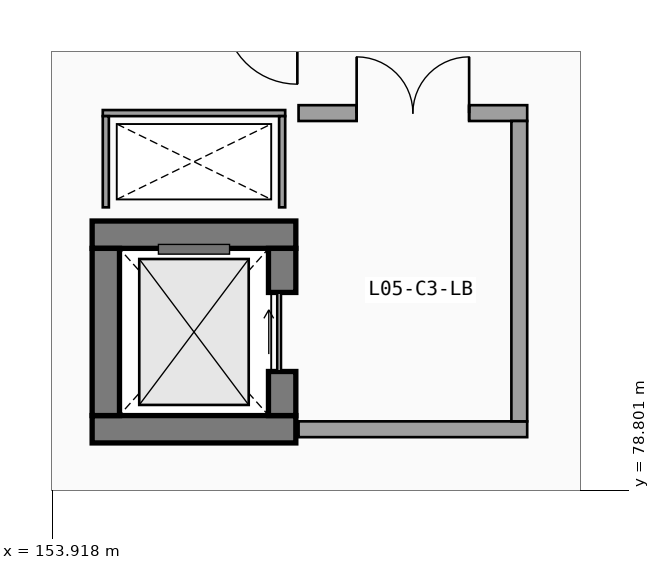
"""IFC4 building model, lengths in metres.
Left out: names, types, materials, properties, quantities, classifications, styles, units other than length and angle.
Written with IfcOpenShell. Run it as: python <this file> out.ifc"""

import sys

from ifc_helpers import new_model, si_unit, direction, frame, frame_2d, origin, place, context, subcontext, project, spatial, rectangle, extrude, element, fill, save


model = new_model("IFC4")
c1 = context("Model", 3, precision=1e-05, world=origin(), true_north=direction((0.0, 1.0)))
c2 = subcontext(c1, "Body", "Model", "MODEL_VIEW")
j1 = project(units=[si_unit("LENGTHUNIT", "METRE"), si_unit("PLANEANGLEUNIT", "RADIAN")], contexts=[c1])
p1 = place(None, origin())
s1 = spatial("IfcSite", under=j1, at=p1, CompositionType="ELEMENT")
p2 = place(p1, origin())
s2 = spatial("IfcBuilding", under=s1, at=p2, CompositionType="ELEMENT")
p3 = place(p2, frame((0.0, 0.0, 23.1)))
s3 = spatial("IfcBuildingStorey", under=s2, at=p3, CompositionType="ELEMENT", Elevation=23.1)
for number, where, z_axis, x_axis in (
    (1, (154.575, 79.8, 0.0), (0.0, 0.0, 1.0), (1.0, 0.0, 0.0)),
    (2, (157.925, 83.0, 0.0), (0.0, 0.0, 1.0), (-1.0, 0.0, 0.0)),
):
    element("IfcWall", number, at=place(p3, frame(where, z_axis=z_axis, x_axis=x_axis)), inside=s3, PredefinedType="SHEAR", context=c2, shape_type="SweptSolid", body=[
        extrude(rectangle(XDim=3.35, YDim=0.45, at=frame_2d((1.675, 0.0))), origin(), (0.0, 0.0, 1.0), 4.82),
    ])
p4 = place(p3, frame((154.8, 82.775, 0.0), z_axis=(0.0, 0.0, 1.0), x_axis=(0.0, -1.0, 0.0)))
e3 = element("IfcWall", 3, at=p4, inside=s3, PredefinedType="SHEAR", context=c2, shape_type="SweptSolid", body=[
    extrude(rectangle(XDim=2.75, YDim=0.45, at=frame_2d((1.375, 0.0))), origin(), (0.0, 0.0, 1.0), 4.82),
])
p5 = place(p3, frame((157.7, 80.025, 0.0), z_axis=(0.0, 0.0, 1.0), x_axis=(0.0, 1.0, 0.0)))
e4 = element("IfcWall", 4, at=p5, inside=s3, PredefinedType="SHEAR", context=c2, shape_type="SweptSolid", body=[
    extrude(rectangle(XDim=2.75, YDim=0.45, at=frame_2d((1.375, 0.0))), origin(), (0.0, 0.0, 1.0), 4.82),
])
p6 = place(p5, frame((0.725, 0.0, 0.0), z_axis=(0.0, 0.0, 1.0), x_axis=(1.0, 0.0, 0.0)))
e5 = element("IfcOpeningElement", 5, at=p6, cuts=e4, PredefinedType="OPENING", context=c2, shape_type="SweptSolid", body=[
    extrude(rectangle(XDim=1.3, YDim=2.25, at=frame_2d((0.65, 1.125))), frame((0.0, 0.235, 0.0), z_axis=(0.0, -1.0, 0.0), x_axis=(1.0, 0.0, 0.0)), (0.0, 0.0, 1.0), 0.47),
])
p7 = place(p3, frame((157.75, 85.0, 0.0), z_axis=(0.0, 0.0, 1.0), x_axis=(-1.0, 0.0, 0.0)))
e6 = element("IfcWall", 6, at=p7, inside=s3, PredefinedType="PARTITIONING", context=c2, shape_type="SweptSolid", body=[
    extrude(rectangle(XDim=3.0, YDim=0.1, at=frame_2d((1.5, 0.0))), origin(), (0.0, 0.0, 1.0), 4.82),
])
for number, where, z_axis, x_axis in (
    (7, (154.8, 84.95, 0.0), (0.0, 0.0, 1.0), (0.0, -1.0, 0.0)),
    (8, (157.7, 83.45, 0.0), (0.0, 0.0, 1.0), (0.0, 1.0, 0.0)),
):
    element("IfcWall", number, at=place(p3, frame(where, z_axis=z_axis, x_axis=x_axis)), inside=s3, PredefinedType="PARTITIONING", context=c2, shape_type="SweptSolid", body=[
        extrude(rectangle(XDim=1.5, YDim=0.1, at=frame_2d((0.75, 0.0))), origin(), (0.0, 0.0, 1.0), 4.82),
    ])
p8 = place(p3, frame((157.97, 79.8, 0.0), z_axis=(0.0, 0.0, 1.0), x_axis=(1.0, 0.0, 0.0)))
e9 = element("IfcWall", 9, at=p8, inside=s3, PredefinedType="SOLIDWALL", context=c2, shape_type="SweptSolid", body=[
    extrude(rectangle(XDim=3.76, YDim=0.26, at=frame_2d((1.88, 0.0))), origin(), (0.0, 0.0, 1.0), 4.82),
])
p9 = place(p3, frame((161.73, 85.0, 0.0), z_axis=(0.0, 0.0, 1.0), x_axis=(-1.0, 0.0, 0.0)))
e10 = element("IfcWall", 10, at=p9, inside=s3, PredefinedType="SOLIDWALL", context=c2, shape_type="SweptSolid", body=[
    extrude(rectangle(XDim=3.76, YDim=0.26, at=frame_2d((1.88, 0.0))), origin(), (0.0, 0.0, 1.0), 4.82),
])
p10 = place(p9, frame((2.805, 0.0, 0.0), z_axis=(0.0, 0.0, 1.0), x_axis=(-1.0, 0.0, 0.0)))
e11 = element("IfcOpeningElement", 11, at=p10, cuts=e10, PredefinedType="OPENING", context=c2, shape_type="SweptSolid", body=[
    extrude(rectangle(XDim=1.85, YDim=2.25, at=frame_2d((0.925, 1.125))), frame((0.0, 0.14, 0.0), z_axis=(0.0, -1.0, 0.0), x_axis=(1.0, 0.0, 0.0)), (0.0, 0.0, 1.0), 0.28),
])
p11 = place(p3, frame((161.6, 79.93, 0.0), z_axis=(0.0, 0.0, 1.0), x_axis=(0.0, 1.0, 0.0)))
e12 = element("IfcWall", 12, at=p11, inside=s3, PredefinedType="SOLIDWALL", context=c2, shape_type="SweptSolid", body=[
    extrude(rectangle(XDim=4.94, YDim=0.26, at=frame_2d((2.47, 0.0))), origin(), (0.0, 0.0, 1.0), 4.82),
])
p12 = place(p6, origin())
e13 = element("IfcDoor", 13, at=p12, inside=s3, OperationType="SLIDING_TO_RIGHT", PredefinedType="DOOR", context=c2, shape_type="SweptSolid", body=[
    extrude(rectangle(XDim=1.3, YDim=2.25, at=frame_2d((0.65, 1.125))), frame((0.0, 0.025, 0.0), z_axis=(0.0, -1.0, 0.0), x_axis=(1.0, 0.0, 0.0)), (0.0, 0.0, 1.0), 0.05),
])
fill(e5, e13)
p13 = place(p10, origin())
e14 = element("IfcDoor", 14, at=p13, inside=s3, OperationType="DOUBLE_DOOR_SINGLE_SWING", PredefinedType="DOOR", context=c2, shape_type="SweptSolid", body=[
    extrude(rectangle(XDim=1.85, YDim=2.25, at=frame_2d((0.925, 1.125))), frame((0.0, 0.025, 0.0), z_axis=(0.0, -1.0, 0.0), x_axis=(1.0, 0.0, 0.0)), (0.0, 0.0, 1.0), 0.05),
])
fill(e11, e14)
save(model, sys.argv[1])
